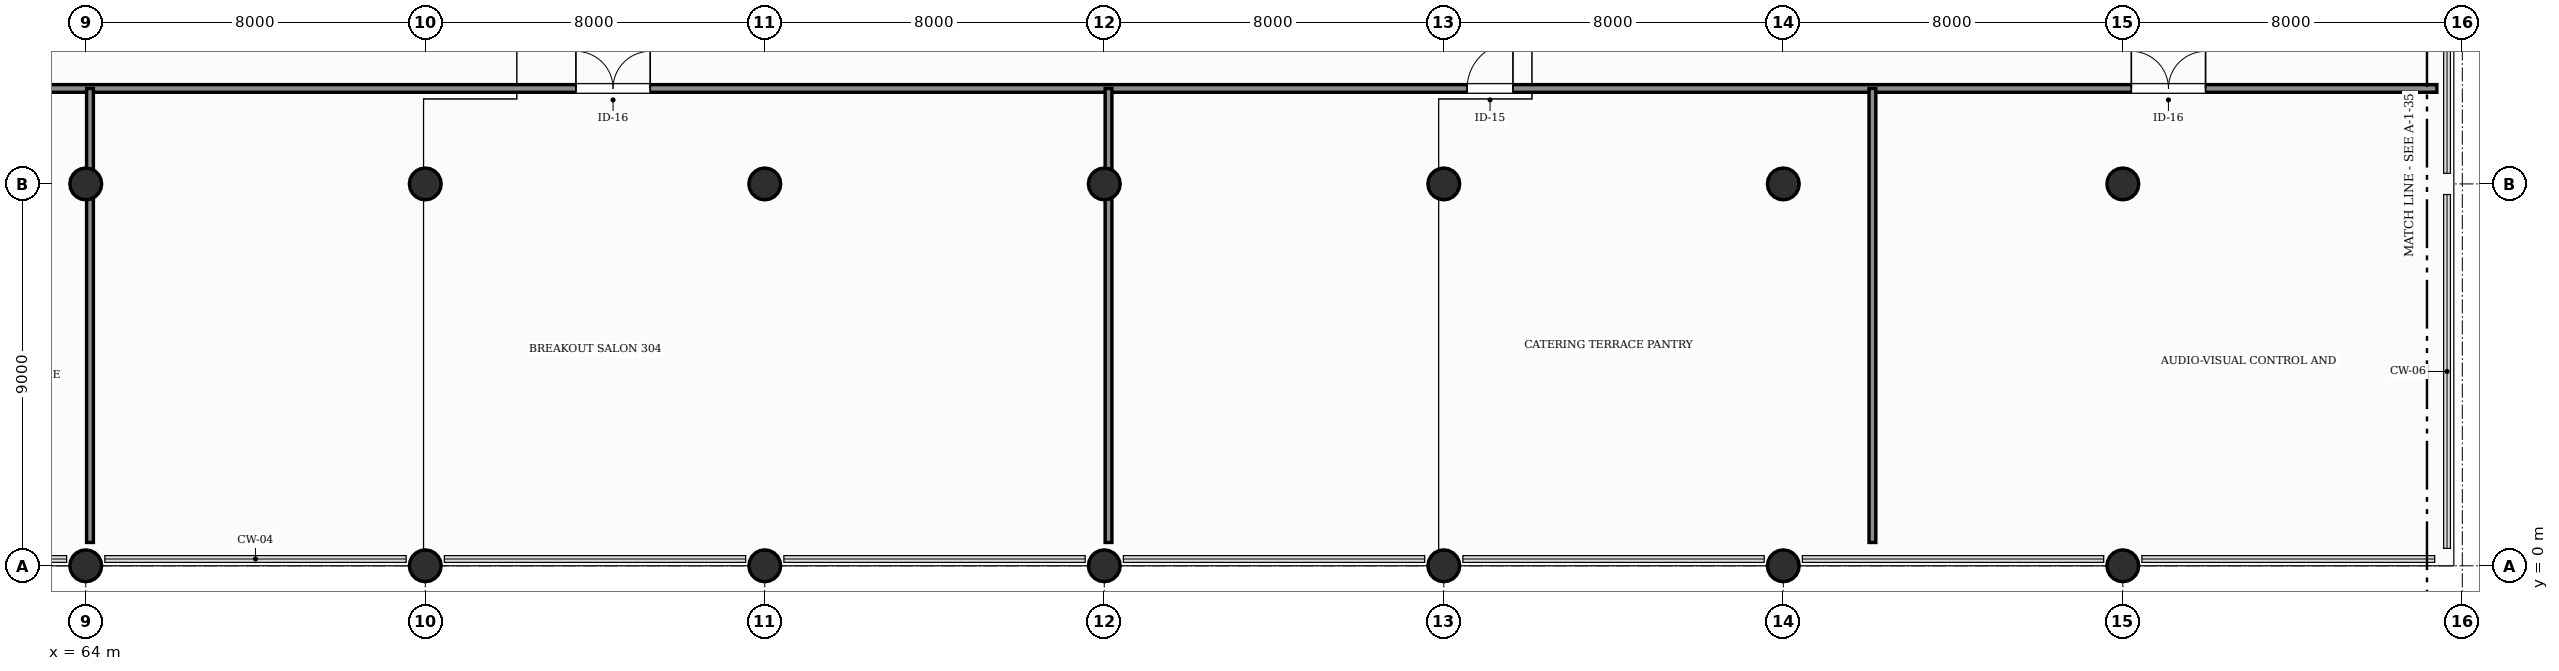
"""IFC4 building model, lengths in metres.
Left out: names, types, materials, properties, quantities, classifications, styles, units other than length and angle.
Written with IfcOpenShell. Run it as: python <this file> out.ifc"""

import sys

from ifc_helpers import new_model, si_unit, direction, frame, frame_2d, origin, origin_2d, place, context, subcontext, project, spatial, rectangle, circle, extrude, element, fill, save


model = new_model("IFC4")
c1 = context("Model", 3, precision=1e-05, world=origin(), true_north=direction((0.0, 1.0)))
c2 = subcontext(c1, "Body", "Model", "MODEL_VIEW")
j1 = project(units=[si_unit("LENGTHUNIT", "METRE"), si_unit("PLANEANGLEUNIT", "RADIAN")], contexts=[c1])
p1 = place(None, origin())
s1 = spatial("IfcSite", under=j1, at=p1, CompositionType="ELEMENT")
p2 = place(p1, origin())
s2 = spatial("IfcBuilding", under=s1, at=p2, CompositionType="ELEMENT")
p3 = place(p2, frame((0.0, 0.0, 16.2)))
s3 = spatial("IfcBuildingStorey", under=s2, at=p3, CompositionType="ELEMENT", Elevation=16.2)
for number, where, z_axis, x_axis in (
    (1, (64.0, 0.0, 0.0), (0.0, 0.0, 1.0), (1.0, 0.0, 0.0)),
    (2, (64.0, 9.0, 0.0), (0.0, 0.0, 1.0), (1.0, 0.0, 0.0)),
    (3, (72.0, 0.0, 0.0), (0.0, 0.0, 1.0), (1.0, 0.0, 0.0)),
    (4, (72.0, 9.0, 0.0), (0.0, 0.0, 1.0), (1.0, 0.0, 0.0)),
    (5, (80.0, 0.0, 0.0), (0.0, 0.0, 1.0), (1.0, 0.0, 0.0)),
    (6, (80.0, 9.0, 0.0), (0.0, 0.0, 1.0), (1.0, 0.0, 0.0)),
    (7, (88.0, 0.0, 0.0), (0.0, 0.0, 1.0), (1.0, 0.0, 0.0)),
    (8, (88.0, 9.0, 0.0), (0.0, 0.0, 1.0), (1.0, 0.0, 0.0)),
    (9, (96.0, 0.0, 0.0), (0.0, 0.0, 1.0), (1.0, 0.0, 0.0)),
    (10, (96.0, 9.0, 0.0), (0.0, 0.0, 1.0), (1.0, 0.0, 0.0)),
    (11, (104.0, 0.0, 0.0), (0.0, 0.0, 1.0), (1.0, 0.0, 0.0)),
    (12, (104.0, 9.0, 0.0), (0.0, 0.0, 1.0), (1.0, 0.0, 0.0)),
    (13, (112.0, 0.0, 0.0), (0.0, 0.0, 1.0), (1.0, 0.0, 0.0)),
    (14, (112.0, 9.0, 0.0), (0.0, 0.0, 1.0), (1.0, 0.0, 0.0)),
):
    element("IfcColumn", number, at=place(p3, frame(where, z_axis=z_axis, x_axis=x_axis)), inside=s3, PredefinedType="COLUMN", context=c2, shape_type="SweptSolid", body=[
        extrude(circle(Radius=0.375, at=origin_2d()), origin(), (0.0, 0.0, 1.0), 4.8),
    ])
p4 = place(p3, frame((0.6, 11.25, 0.0), z_axis=(0.0, 0.0, 1.0), x_axis=(1.0, 0.0, 0.0)))
e15 = element("IfcWall", 15, at=p4, inside=s3, PredefinedType="PARTITIONING", context=c2, shape_type="SweptSolid", body=[
    extrude(rectangle(XDim=118.8, YDim=0.18, at=frame_2d((59.4, 0.0))), origin(), (0.0, 0.0, 1.0), 3.55),
])
p5 = place(p4, frame((9.2, 0.0, 0.0)))
e16 = element("IfcOpeningElement", 16, at=p5, cuts=e15, PredefinedType="OPENING", context=c2, shape_type="SweptSolid", body=[
    extrude(rectangle(XDim=1.08, YDim=2.3, at=frame_2d((0.54, 1.15))), frame((0.0, 0.1, 0.0), z_axis=(0.0, -1.0, 0.0), x_axis=(1.0, 0.0, 0.0)), (0.0, 0.0, 1.0), 0.2),
])
p6 = place(p4, frame((28.95, 0.0, 0.0)))
e17 = element("IfcOpeningElement", 17, at=p6, cuts=e15, PredefinedType="OPENING", context=c2, shape_type="SweptSolid", body=[
    extrude(rectangle(XDim=1.75, YDim=2.35, at=frame_2d((0.875, 1.175))), frame((0.0, 0.1, 0.0), z_axis=(0.0, -1.0, 0.0), x_axis=(1.0, 0.0, 0.0)), (0.0, 0.0, 1.0), 0.2),
])
p7 = place(p4, frame((50.95, 0.0, 0.0)))
e18 = element("IfcOpeningElement", 18, at=p7, cuts=e15, PredefinedType="OPENING", context=c2, shape_type="SweptSolid", body=[
    extrude(rectangle(XDim=1.08, YDim=2.3, at=frame_2d((0.54, 1.15))), frame((0.0, 0.1, 0.0), z_axis=(0.0, -1.0, 0.0), x_axis=(1.0, 0.0, 0.0)), (0.0, 0.0, 1.0), 0.2),
])
p8 = place(p4, frame((74.95, 0.0, 0.0)))
e19 = element("IfcOpeningElement", 19, at=p8, cuts=e15, PredefinedType="OPENING", context=c2, shape_type="SweptSolid", body=[
    extrude(rectangle(XDim=1.75, YDim=2.35, at=frame_2d((0.875, 1.175))), frame((0.0, 0.1, 0.0), z_axis=(0.0, -1.0, 0.0), x_axis=(1.0, 0.0, 0.0)), (0.0, 0.0, 1.0), 0.2),
])
p9 = place(p4, frame((95.95, 0.0, 0.0)))
e20 = element("IfcOpeningElement", 20, at=p9, cuts=e15, PredefinedType="OPENING", context=c2, shape_type="SweptSolid", body=[
    extrude(rectangle(XDim=1.08, YDim=2.3, at=frame_2d((0.54, 1.15))), frame((0.0, 0.1, 0.0), z_axis=(0.0, -1.0, 0.0), x_axis=(1.0, 0.0, 0.0)), (0.0, 0.0, 1.0), 0.2),
])
p10 = place(p4, frame((111.6, 0.0, 0.0)))
e21 = element("IfcOpeningElement", 21, at=p10, cuts=e15, PredefinedType="OPENING", context=c2, shape_type="SweptSolid", body=[
    extrude(rectangle(XDim=1.75, YDim=2.35, at=frame_2d((0.875, 1.175))), frame((0.0, 0.1, 0.0), z_axis=(0.0, -1.0, 0.0), x_axis=(1.0, 0.0, 0.0)), (0.0, 0.0, 1.0), 0.2),
])
for number, where, z_axis, x_axis in (
    (22, (64.1, 0.55, 0.0), (0.0, 0.0, 1.0), (0.0, 1.0, 0.0)),
    (23, (88.1, 0.55, 0.0), (0.0, 0.0, 1.0), (0.0, 1.0, 0.0)),
    (24, (106.1, 0.55, 0.0), (0.0, 0.0, 1.0), (0.0, 1.0, 0.0)),
):
    element("IfcWall", number, at=place(p3, frame(where, z_axis=z_axis, x_axis=x_axis)), inside=s3, PredefinedType="PARTITIONING", context=c2, shape_type="SweptSolid", body=[
        extrude(rectangle(XDim=10.7, YDim=0.16, at=frame_2d((5.35, 0.0))), origin(), (0.0, 0.0, 1.0), 3.55),
    ])
p11 = place(p8, origin())
e25 = element("IfcDoor", 25, at=p11, inside=s3, OperationType="DOUBLE_DOOR_SINGLE_SWING", PredefinedType="DOOR", context=c2, shape_type="SweptSolid", body=[
    extrude(rectangle(XDim=1.75, YDim=2.35, at=frame_2d((0.875, 1.175))), frame((0.0, 0.025, 0.0), z_axis=(0.0, -1.0, 0.0), x_axis=(1.0, 0.0, 0.0)), (0.0, 0.0, 1.0), 0.05),
])
fill(e19, e25)
p12 = place(p9, origin())
e26 = element("IfcDoor", 26, at=p12, inside=s3, OperationType="SINGLE_SWING_RIGHT", PredefinedType="DOOR", context=c2, shape_type="SweptSolid", body=[
    extrude(rectangle(XDim=1.08, YDim=2.3, at=frame_2d((0.54, 1.15))), frame((0.0, 0.025, 0.0), z_axis=(0.0, -1.0, 0.0), x_axis=(1.0, 0.0, 0.0)), (0.0, 0.0, 1.0), 0.05),
])
fill(e20, e26)
p13 = place(p10, origin())
e27 = element("IfcDoor", 27, at=p13, inside=s3, OperationType="DOUBLE_DOOR_SINGLE_SWING", PredefinedType="DOOR", context=c2, shape_type="SweptSolid", body=[
    extrude(rectangle(XDim=1.75, YDim=2.35, at=frame_2d((0.875, 1.175))), frame((0.0, 0.025, 0.0), z_axis=(0.0, -1.0, 0.0), x_axis=(1.0, 0.0, 0.0)), (0.0, 0.0, 1.0), 0.05),
])
fill(e21, e27)
save(model, sys.argv[1])
